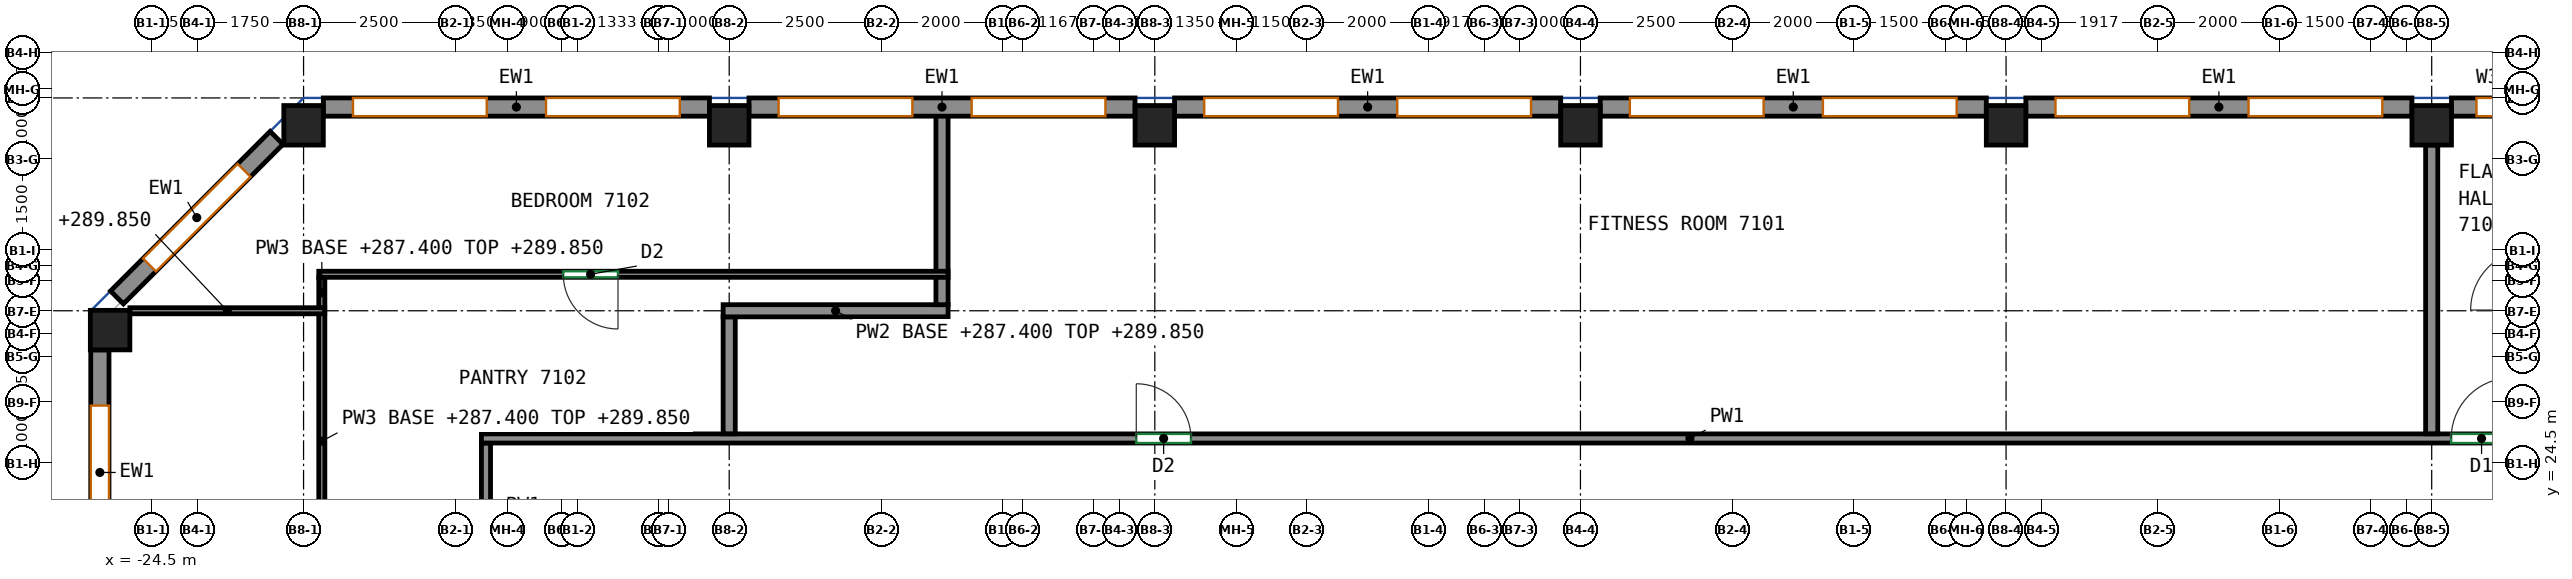
"""IFC4 building model, lengths in metres.
Left out: names, types, materials, properties, quantities, classifications, styles, units other than length and angle.
Written with IfcOpenShell. Run it as: python <this file> out.ifc"""

import sys

from ifc_helpers import new_model, si_unit, direction, frame, frame_2d, origin, origin_2d, place, context, subcontext, project, spatial, rectangle, extrude, source, transform, mapped, element, fill, save


model = new_model("IFC4")
c1 = context("Model", 3, precision=1e-05, world=origin(), true_north=direction((0.0, 1.0)))
c2 = subcontext(c1, "Body", "Model", "MODEL_VIEW")
j1 = project(units=[si_unit("LENGTHUNIT", "METRE"), si_unit("PLANEANGLEUNIT", "RADIAN")], contexts=[c1])
p1 = place(None, origin())
s1 = spatial("IfcSite", under=j1, at=p1, CompositionType="ELEMENT")
p2 = place(p1, origin())
s2 = spatial("IfcBuilding", under=s1, at=p2, CompositionType="ELEMENT")
p3 = place(p2, frame((0.0, 0.0, 287.4)))
s3 = spatial("IfcBuildingStorey", under=s2, at=p3, CompositionType="ELEMENT", Elevation=287.4)
m1 = source(origin(), c2, "Body", "SweptSolid", [
    extrude(rectangle(XDim=0.65, YDim=0.65, at=origin_2d()), origin(), (0.0, 0.0, 1.0), 3.0),
])
for number, where, z_axis, x_axis in (
    (1, (-25.182, 26.682, 0.0), (0.0, 0.0, 1.0), (1.0, 0.0, 0.0)),
    (2, (-22.0, 30.05, 0.0), (0.0, 0.0, 1.0), (1.0, 0.0, 0.0)),
    (3, (-15.0, 30.05, 0.0), (0.0, 0.0, 1.0), (1.0, 0.0, 0.0)),
    (4, (-8.0, 30.05, 0.0), (0.0, 0.0, 1.0), (1.0, 0.0, 0.0)),
    (5, (-1.0, 30.05, 0.0), (0.0, 0.0, 1.0), (1.0, 0.0, 0.0)),
    (6, (6.0, 30.05, 0.0), (0.0, 0.0, 1.0), (1.0, 0.0, 0.0)),
    (7, (13.0, 30.05, 0.0), (0.0, 0.0, 1.0), (1.0, 0.0, 0.0)),
):
    element("IfcColumn", number, at=place(p3, frame(where, z_axis=z_axis, x_axis=x_axis)), inside=s3, PredefinedType="COLUMN", context=c2, shape_type="MappedRepresentation", body=[
        mapped(m1, transform((0.0, 0.0, 0.0))),
    ])
m2 = source(origin(), c2, "Body", "SweptSolid", [
    extrude(rectangle(XDim=6.032, YDim=0.3, at=frame_2d((3.016, 0.0))), origin(), (0.0, 0.0, 1.0), 3.0),
])
p4 = place(p3, frame((19.357, 30.35, 0.0), z_axis=(0.0, 0.0, 1.0), x_axis=(-1.0, 0.0, 0.0)))
e8 = element("IfcWall", 8, at=p4, inside=s3, PredefinedType="SOLIDWALL", context=c2, shape_type="MappedRepresentation", body=[
    mapped(m2, transform((0.0, 0.0, 0.0))),
])
p5 = place(p4, frame((0.408, 0.0, 0.8)))
e9 = element("IfcOpeningElement", 9, at=p5, cuts=e8, PredefinedType="OPENING", context=c2, shape_type="SweptSolid", body=[
    extrude(rectangle(XDim=2.2, YDim=2.05, at=frame_2d((1.1, 1.025))), frame((0.0, 0.16, 0.0), z_axis=(0.0, -1.0, 0.0), x_axis=(1.0, 0.0, 0.0)), (0.0, 0.0, 1.0), 0.32),
])
p6 = place(p4, frame((3.445, 0.0, 0.8)))
e10 = element("IfcOpeningElement", 10, at=p6, cuts=e8, PredefinedType="OPENING", context=c2, shape_type="SweptSolid", body=[
    extrude(rectangle(XDim=1.1, YDim=2.05, at=frame_2d((0.55, 1.025))), frame((0.0, 0.16, 0.0), z_axis=(0.0, -1.0, 0.0), x_axis=(1.0, 0.0, 0.0)), (0.0, 0.0, 1.0), 0.32),
])
p7 = place(p4, frame((4.87, 0.0, 0.8)))
e11 = element("IfcOpeningElement", 11, at=p7, cuts=e8, PredefinedType="OPENING", context=c2, shape_type="SweptSolid", body=[
    extrude(rectangle(XDim=0.75, YDim=2.05, at=frame_2d((0.375, 1.025))), frame((0.0, 0.16, 0.0), z_axis=(0.0, -1.0, 0.0), x_axis=(1.0, 0.0, 0.0)), (0.0, 0.0, 1.0), 0.32),
])
m3 = source(origin(), c2, "Body", "SweptSolid", [
    extrude(rectangle(XDim=6.35, YDim=0.3, at=frame_2d((3.175, 0.0))), origin(), (0.0, 0.0, 1.0), 3.0),
])
p8 = place(p3, frame((12.675, 30.35, 0.0), z_axis=(0.0, 0.0, 1.0), x_axis=(-1.0, 0.0, 0.0)))
e12 = element("IfcWall", 12, at=p8, inside=s3, PredefinedType="SOLIDWALL", context=c2, shape_type="MappedRepresentation", body=[
    mapped(m3, transform((0.0, 0.0, 0.0))),
])
p9 = place(p8, frame((0.488, 0.0, 0.8)))
e13 = element("IfcOpeningElement", 13, at=p9, cuts=e12, PredefinedType="OPENING", context=c2, shape_type="SweptSolid", body=[
    extrude(rectangle(XDim=2.2, YDim=2.05, at=frame_2d((1.1, 1.025))), frame((0.0, 0.16, 0.0), z_axis=(0.0, -1.0, 0.0), x_axis=(1.0, 0.0, 0.0)), (0.0, 0.0, 1.0), 0.32),
])
p10 = place(p8, frame((3.663, 0.0, 0.8)))
e14 = element("IfcOpeningElement", 14, at=p10, cuts=e12, PredefinedType="OPENING", context=c2, shape_type="SweptSolid", body=[
    extrude(rectangle(XDim=2.2, YDim=2.05, at=frame_2d((1.1, 1.025))), frame((0.0, 0.16, 0.0), z_axis=(0.0, -1.0, 0.0), x_axis=(1.0, 0.0, 0.0)), (0.0, 0.0, 1.0), 0.32),
])
p11 = place(p3, frame((5.675, 30.35, 0.0), z_axis=(0.0, 0.0, 1.0), x_axis=(-1.0, 0.0, 0.0)))
e15 = element("IfcWall", 15, at=p11, inside=s3, PredefinedType="SOLIDWALL", context=c2, shape_type="MappedRepresentation", body=[
    mapped(m3, transform((0.0, 0.0, 0.0))),
])
p12 = place(p11, frame((0.488, 0.0, 0.8)))
e16 = element("IfcOpeningElement", 16, at=p12, cuts=e15, PredefinedType="OPENING", context=c2, shape_type="SweptSolid", body=[
    extrude(rectangle(XDim=2.2, YDim=2.05, at=frame_2d((1.1, 1.025))), frame((0.0, 0.16, 0.0), z_axis=(0.0, -1.0, 0.0), x_axis=(1.0, 0.0, 0.0)), (0.0, 0.0, 1.0), 0.32),
])
p13 = place(p11, frame((3.663, 0.0, 0.8)))
e17 = element("IfcOpeningElement", 17, at=p13, cuts=e15, PredefinedType="OPENING", context=c2, shape_type="SweptSolid", body=[
    extrude(rectangle(XDim=2.2, YDim=2.05, at=frame_2d((1.1, 1.025))), frame((0.0, 0.16, 0.0), z_axis=(0.0, -1.0, 0.0), x_axis=(1.0, 0.0, 0.0)), (0.0, 0.0, 1.0), 0.32),
])
p14 = place(p3, frame((-1.325, 30.35, 0.0), z_axis=(0.0, 0.0, 1.0), x_axis=(-1.0, 0.0, 0.0)))
e18 = element("IfcWall", 18, at=p14, inside=s3, PredefinedType="SOLIDWALL", context=c2, shape_type="MappedRepresentation", body=[
    mapped(m3, transform((0.0, 0.0, 0.0))),
])
p15 = place(p14, frame((0.488, 0.0, 0.8)))
e19 = element("IfcOpeningElement", 19, at=p15, cuts=e18, PredefinedType="OPENING", context=c2, shape_type="SweptSolid", body=[
    extrude(rectangle(XDim=2.2, YDim=2.05, at=frame_2d((1.1, 1.025))), frame((0.0, 0.16, 0.0), z_axis=(0.0, -1.0, 0.0), x_axis=(1.0, 0.0, 0.0)), (0.0, 0.0, 1.0), 0.32),
])
p16 = place(p14, frame((3.663, 0.0, 0.8)))
e20 = element("IfcOpeningElement", 20, at=p16, cuts=e18, PredefinedType="OPENING", context=c2, shape_type="SweptSolid", body=[
    extrude(rectangle(XDim=2.2, YDim=2.05, at=frame_2d((1.1, 1.025))), frame((0.0, 0.16, 0.0), z_axis=(0.0, -1.0, 0.0), x_axis=(1.0, 0.0, 0.0)), (0.0, 0.0, 1.0), 0.32),
])
p17 = place(p3, frame((-8.325, 30.35, 0.0), z_axis=(0.0, 0.0, 1.0), x_axis=(-1.0, 0.0, 0.0)))
e21 = element("IfcWall", 21, at=p17, inside=s3, PredefinedType="SOLIDWALL", context=c2, shape_type="MappedRepresentation", body=[
    mapped(m3, transform((0.0, 0.0, 0.0))),
])
p18 = place(p17, frame((0.488, 0.0, 0.8)))
e22 = element("IfcOpeningElement", 22, at=p18, cuts=e21, PredefinedType="OPENING", context=c2, shape_type="SweptSolid", body=[
    extrude(rectangle(XDim=2.2, YDim=2.05, at=frame_2d((1.1, 1.025))), frame((0.0, 0.16, 0.0), z_axis=(0.0, -1.0, 0.0), x_axis=(1.0, 0.0, 0.0)), (0.0, 0.0, 1.0), 0.32),
])
p19 = place(p17, frame((3.663, 0.0, 0.8)))
e23 = element("IfcOpeningElement", 23, at=p19, cuts=e21, PredefinedType="OPENING", context=c2, shape_type="SweptSolid", body=[
    extrude(rectangle(XDim=2.2, YDim=2.05, at=frame_2d((1.1, 1.025))), frame((0.0, 0.16, 0.0), z_axis=(0.0, -1.0, 0.0), x_axis=(1.0, 0.0, 0.0)), (0.0, 0.0, 1.0), 0.32),
])
p20 = place(p3, frame((-15.325, 30.35, 0.0), z_axis=(0.0, 0.0, 1.0), x_axis=(-1.0, 0.0, 0.0)))
e24 = element("IfcWall", 24, at=p20, inside=s3, PredefinedType="SOLIDWALL", context=c2, shape_type="MappedRepresentation", body=[
    mapped(m3, transform((0.0, 0.0, 0.0))),
])
p21 = place(p20, frame((0.488, 0.0, 0.8)))
e25 = element("IfcOpeningElement", 25, at=p21, cuts=e24, PredefinedType="OPENING", context=c2, shape_type="SweptSolid", body=[
    extrude(rectangle(XDim=2.2, YDim=2.05, at=frame_2d((1.1, 1.025))), frame((0.0, 0.16, 0.0), z_axis=(0.0, -1.0, 0.0), x_axis=(1.0, 0.0, 0.0)), (0.0, 0.0, 1.0), 0.32),
])
p22 = place(p20, frame((3.663, 0.0, 0.8)))
e26 = element("IfcOpeningElement", 26, at=p22, cuts=e24, PredefinedType="OPENING", context=c2, shape_type="SweptSolid", body=[
    extrude(rectangle(XDim=2.2, YDim=2.05, at=frame_2d((1.1, 1.025))), frame((0.0, 0.16, 0.0), z_axis=(0.0, -1.0, 0.0), x_axis=(1.0, 0.0, 0.0)), (0.0, 0.0, 1.0), 0.32),
])
m4 = source(origin(), c2, "Body", "SweptSolid", [
    extrude(rectangle(XDim=3.712, YDim=0.3, at=frame_2d((1.856, 0.0))), origin(), (0.0, 0.0, 1.0), 3.0),
])
p23 = place(p3, frame((-22.444, 29.844, 0.0), z_axis=(0.0, 0.0, 1.0), x_axis=(-0.707106781187, -0.707106781187, 0.0)))
e27 = element("IfcWall", 27, at=p23, inside=s3, PredefinedType="SOLIDWALL", context=c2, shape_type="MappedRepresentation", body=[
    mapped(m4, transform((0.0, 0.0, 0.0))),
])
p24 = place(p23, frame((0.756, 0.0, 0.8)))
e28 = element("IfcOpeningElement", 28, at=p24, cuts=e27, PredefinedType="OPENING", context=c2, shape_type="SweptSolid", body=[
    extrude(rectangle(XDim=2.2, YDim=2.05, at=frame_2d((1.1, 1.025))), frame((0.0, 0.16, 0.0), z_axis=(0.0, -1.0, 0.0), x_axis=(1.0, 0.0, 0.0)), (0.0, 0.0, 1.0), 0.32),
])
m5 = source(origin(), c2, "Body", "SweptSolid", [
    extrude(rectangle(XDim=4.032, YDim=0.3, at=frame_2d((2.016, 0.0))), origin(), (0.0, 0.0, 1.0), 3.0),
])
p25 = place(p3, frame((-25.35, 26.357, 0.0), z_axis=(0.0, 0.0, 1.0), x_axis=(0.0, -1.0, 0.0)))
e29 = element("IfcWall", 29, at=p25, inside=s3, PredefinedType="SOLIDWALL", context=c2, shape_type="MappedRepresentation", body=[
    mapped(m5, transform((0.0, 0.0, 0.0))),
])
p26 = place(p25, frame((0.916, 0.0, 0.8)))
e30 = element("IfcOpeningElement", 30, at=p26, cuts=e29, PredefinedType="OPENING", context=c2, shape_type="SweptSolid", body=[
    extrude(rectangle(XDim=2.2, YDim=2.05, at=frame_2d((1.1, 1.025))), frame((0.0, 0.16, 0.0), z_axis=(0.0, -1.0, 0.0), x_axis=(1.0, 0.0, 0.0)), (0.0, 0.0, 1.0), 0.32),
])
p27 = place(p3, frame((-19.0, 22.74, 0.0), z_axis=(0.0, 0.0, 1.0), x_axis=(0.0, 1.0, 0.0)))
e31 = element("IfcWall", 31, at=p27, inside=s3, PredefinedType="PARTITIONING", context=c2, shape_type="SweptSolid", body=[
    extrude(rectangle(XDim=2.085, YDim=0.15, at=frame_2d((1.042, 0.0))), origin(), (0.0, 0.0, 1.0), 3.0),
])
p28 = place(p3, frame((-19.075, 24.9, 0.0), z_axis=(0.0, 0.0, 1.0), x_axis=(1.0, 0.0, 0.0)))
e32 = element("IfcWall", 32, at=p28, inside=s3, PredefinedType="PARTITIONING", context=c2, shape_type="SweptSolid", body=[
    extrude(rectangle(XDim=39.75, YDim=0.15, at=frame_2d((19.875, 0.0))), origin(), (0.0, 0.0, 1.0), 3.0),
])
p29 = place(p28, frame((10.77, 0.0, 0.0)))
e33 = element("IfcOpeningElement", 33, at=p29, cuts=e32, PredefinedType="OPENING", context=c2, shape_type="SweptSolid", body=[
    extrude(rectangle(XDim=0.9, YDim=2.1, at=frame_2d((0.45, 1.05))), frame((0.0, 0.085, 0.0), z_axis=(0.0, -1.0, 0.0), x_axis=(1.0, 0.0, 0.0)), (0.0, 0.0, 1.0), 0.17),
])
p30 = place(p28, frame((32.395, 0.0, 0.0)))
e34 = element("IfcOpeningElement", 34, at=p30, cuts=e32, PredefinedType="OPENING", context=c2, shape_type="SweptSolid", body=[
    extrude(rectangle(XDim=1.0, YDim=2.1, at=frame_2d((0.5, 1.05))), frame((0.0, 0.085, 0.0), z_axis=(0.0, -1.0, 0.0), x_axis=(1.0, 0.0, 0.0)), (0.0, 0.0, 1.0), 0.17),
])
p31 = place(p3, frame((13.0, 24.977, 0.0), z_axis=(0.0, 0.0, 1.0), x_axis=(0.0, 1.0, 0.0)))
e35 = element("IfcWall", 35, at=p31, inside=s3, PredefinedType="PARTITIONING", context=c2, shape_type="SweptSolid", body=[
    extrude(rectangle(XDim=4.748, YDim=0.2, at=frame_2d((2.374, 0.0))), origin(), (0.0, 0.0, 1.0), 3.0),
])
p32 = place(p3, frame((-15.0, 26.9, 0.0), z_axis=(0.0, 0.0, 1.0), x_axis=(0.0, -1.0, 0.0)))
e36 = element("IfcWall", 36, at=p32, inside=s3, PredefinedType="PARTITIONING", context=c2, shape_type="SweptSolid", body=[
    extrude(rectangle(XDim=1.923, YDim=0.2, at=frame_2d((0.961, 0.0))), origin(), (0.0, 0.0, 1.0), 3.0),
])
p33 = place(p3, frame((-11.4, 27.0, 0.0), z_axis=(0.0, 0.0, 1.0), x_axis=(-1.0, 0.0, 0.0)))
e37 = element("IfcWall", 37, at=p33, inside=s3, PredefinedType="PARTITIONING", context=c2, shape_type="SweptSolid", body=[
    extrude(rectangle(XDim=3.7, YDim=0.2, at=frame_2d((1.85, 0.0))), origin(), (0.0, 0.0, 1.0), 2.45),
])
p34 = place(p3, frame((-11.5, 27.1, 0.0), z_axis=(0.0, 0.0, 1.0), x_axis=(0.0, 1.0, 0.0)))
e38 = element("IfcWall", 38, at=p34, inside=s3, PredefinedType="PARTITIONING", context=c2, shape_type="SweptSolid", body=[
    extrude(rectangle(XDim=0.46, YDim=0.2, at=frame_2d((0.23, 0.0))), origin(), (0.0, 0.0, 1.0), 3.0),
])
p35 = place(p3, frame((-11.5, 27.642, 0.0), z_axis=(0.0, 0.0, 1.0), x_axis=(0.0, 1.0, 0.0)))
e39 = element("IfcWall", 39, at=p35, inside=s3, PredefinedType="PARTITIONING", context=c2, shape_type="SweptSolid", body=[
    extrude(rectangle(XDim=2.608, YDim=0.2, at=frame_2d((1.304, 0.0))), origin(), (0.0, 0.0, 1.0), 3.0),
])
p36 = place(p3, frame((-21.7, 22.75, 0.0), z_axis=(0.0, 0.0, 1.0), x_axis=(0.0, 1.0, 0.0)))
e40 = element("IfcWall", 40, at=p36, inside=s3, PredefinedType="PARTITIONING", context=c2, shape_type="SweptSolid", body=[
    extrude(rectangle(XDim=4.21, YDim=0.1, at=frame_2d((2.105, 0.0))), origin(), (0.0, 0.0, 1.0), 2.45),
])
p37 = place(p3, frame((-21.7, 27.04, 0.0), z_axis=(0.0, 0.0, 1.0), x_axis=(0.0, 1.0, 0.0)))
e41 = element("IfcWall", 41, at=p37, inside=s3, PredefinedType="PARTITIONING", context=c2, shape_type="SweptSolid", body=[
    extrude(rectangle(XDim=0.51, YDim=0.1, at=frame_2d((0.255, 0.0))), origin(), (0.0, 0.0, 1.0), 2.45),
])
p38 = place(p3, frame((-11.4, 27.6, 0.0), z_axis=(0.0, 0.0, 1.0), x_axis=(-1.0, 0.0, 0.0)))
e42 = element("IfcWall", 42, at=p38, inside=s3, PredefinedType="PARTITIONING", context=c2, shape_type="SweptSolid", body=[
    extrude(rectangle(XDim=10.35, YDim=0.1, at=frame_2d((5.175, 0.0))), origin(), (0.0, 0.0, 1.0), 3.0),
])
p39 = place(p38, frame((5.429, 0.0, 0.0)))
e43 = element("IfcOpeningElement", 43, at=p39, cuts=e42, PredefinedType="OPENING", context=c2, shape_type="SweptSolid", body=[
    extrude(rectangle(XDim=0.9, YDim=2.1, at=frame_2d((0.45, 1.05))), frame((0.0, 0.06, 0.0), z_axis=(0.0, -1.0, 0.0), x_axis=(1.0, 0.0, 0.0)), (0.0, 0.0, 1.0), 0.12),
])
p40 = place(p3, frame((-21.652, 27.0, 0.0), z_axis=(0.0, 0.0, 1.0), x_axis=(-1.0, 0.0, 0.0)))
e44 = element("IfcWall", 44, at=p40, inside=s3, PredefinedType="PARTITIONING", context=c2, shape_type="SweptSolid", body=[
    extrude(rectangle(XDim=3.205, YDim=0.1, at=frame_2d((1.603, 0.0))), origin(), (0.0, 0.0, 1.0), 2.45),
])
p41 = place(p9, origin())
e45 = element("IfcWindow", 45, at=p41, inside=s3, PartitioningType="SINGLE_PANEL", PredefinedType="WINDOW", context=c2, shape_type="SweptSolid", body=[
    extrude(rectangle(XDim=2.2, YDim=2.05, at=frame_2d((1.1, 1.025))), frame((0.0, 0.03, 0.0), z_axis=(0.0, -1.0, 0.0), x_axis=(1.0, 0.0, 0.0)), (0.0, 0.0, 1.0), 0.06),
])
fill(e13, e45)
p42 = place(p10, origin())
e46 = element("IfcWindow", 46, at=p42, inside=s3, PartitioningType="SINGLE_PANEL", PredefinedType="WINDOW", context=c2, shape_type="SweptSolid", body=[
    extrude(rectangle(XDim=2.2, YDim=2.05, at=frame_2d((1.1, 1.025))), frame((0.0, 0.03, 0.0), z_axis=(0.0, -1.0, 0.0), x_axis=(1.0, 0.0, 0.0)), (0.0, 0.0, 1.0), 0.06),
])
fill(e14, e46)
p43 = place(p12, origin())
e47 = element("IfcWindow", 47, at=p43, inside=s3, PartitioningType="SINGLE_PANEL", PredefinedType="WINDOW", context=c2, shape_type="SweptSolid", body=[
    extrude(rectangle(XDim=2.2, YDim=2.05, at=frame_2d((1.1, 1.025))), frame((0.0, 0.03, 0.0), z_axis=(0.0, -1.0, 0.0), x_axis=(1.0, 0.0, 0.0)), (0.0, 0.0, 1.0), 0.06),
])
fill(e16, e47)
p44 = place(p13, origin())
e48 = element("IfcWindow", 48, at=p44, inside=s3, PartitioningType="SINGLE_PANEL", PredefinedType="WINDOW", context=c2, shape_type="SweptSolid", body=[
    extrude(rectangle(XDim=2.2, YDim=2.05, at=frame_2d((1.1, 1.025))), frame((0.0, 0.03, 0.0), z_axis=(0.0, -1.0, 0.0), x_axis=(1.0, 0.0, 0.0)), (0.0, 0.0, 1.0), 0.06),
])
fill(e17, e48)
p45 = place(p15, origin())
e49 = element("IfcWindow", 49, at=p45, inside=s3, PartitioningType="SINGLE_PANEL", PredefinedType="WINDOW", context=c2, shape_type="SweptSolid", body=[
    extrude(rectangle(XDim=2.2, YDim=2.05, at=frame_2d((1.1, 1.025))), frame((0.0, 0.03, 0.0), z_axis=(0.0, -1.0, 0.0), x_axis=(1.0, 0.0, 0.0)), (0.0, 0.0, 1.0), 0.06),
])
fill(e19, e49)
p46 = place(p16, origin())
e50 = element("IfcWindow", 50, at=p46, inside=s3, PartitioningType="SINGLE_PANEL", PredefinedType="WINDOW", context=c2, shape_type="SweptSolid", body=[
    extrude(rectangle(XDim=2.2, YDim=2.05, at=frame_2d((1.1, 1.025))), frame((0.0, 0.03, 0.0), z_axis=(0.0, -1.0, 0.0), x_axis=(1.0, 0.0, 0.0)), (0.0, 0.0, 1.0), 0.06),
])
fill(e20, e50)
p47 = place(p18, origin())
e51 = element("IfcWindow", 51, at=p47, inside=s3, PartitioningType="SINGLE_PANEL", PredefinedType="WINDOW", context=c2, shape_type="SweptSolid", body=[
    extrude(rectangle(XDim=2.2, YDim=2.05, at=frame_2d((1.1, 1.025))), frame((0.0, 0.03, 0.0), z_axis=(0.0, -1.0, 0.0), x_axis=(1.0, 0.0, 0.0)), (0.0, 0.0, 1.0), 0.06),
])
fill(e22, e51)
p48 = place(p19, origin())
e52 = element("IfcWindow", 52, at=p48, inside=s3, PartitioningType="SINGLE_PANEL", PredefinedType="WINDOW", context=c2, shape_type="SweptSolid", body=[
    extrude(rectangle(XDim=2.2, YDim=2.05, at=frame_2d((1.1, 1.025))), frame((0.0, 0.03, 0.0), z_axis=(0.0, -1.0, 0.0), x_axis=(1.0, 0.0, 0.0)), (0.0, 0.0, 1.0), 0.06),
])
fill(e23, e52)
p49 = place(p21, origin())
e53 = element("IfcWindow", 53, at=p49, inside=s3, PartitioningType="SINGLE_PANEL", PredefinedType="WINDOW", context=c2, shape_type="SweptSolid", body=[
    extrude(rectangle(XDim=2.2, YDim=2.05, at=frame_2d((1.1, 1.025))), frame((0.0, 0.03, 0.0), z_axis=(0.0, -1.0, 0.0), x_axis=(1.0, 0.0, 0.0)), (0.0, 0.0, 1.0), 0.06),
])
fill(e25, e53)
p50 = place(p22, origin())
e54 = element("IfcWindow", 54, at=p50, inside=s3, PartitioningType="SINGLE_PANEL", PredefinedType="WINDOW", context=c2, shape_type="SweptSolid", body=[
    extrude(rectangle(XDim=2.2, YDim=2.05, at=frame_2d((1.1, 1.025))), frame((0.0, 0.03, 0.0), z_axis=(0.0, -1.0, 0.0), x_axis=(1.0, 0.0, 0.0)), (0.0, 0.0, 1.0), 0.06),
])
fill(e26, e54)
p51 = place(p24, origin())
e55 = element("IfcWindow", 55, at=p51, inside=s3, PartitioningType="SINGLE_PANEL", PredefinedType="WINDOW", context=c2, shape_type="SweptSolid", body=[
    extrude(rectangle(XDim=2.2, YDim=2.05, at=frame_2d((1.1, 1.025))), frame((0.0, 0.03, 0.0), z_axis=(0.0, -1.0, 0.0), x_axis=(1.0, 0.0, 0.0)), (0.0, 0.0, 1.0), 0.06),
])
fill(e28, e55)
p52 = place(p26, origin())
e56 = element("IfcWindow", 56, at=p52, inside=s3, PartitioningType="SINGLE_PANEL", PredefinedType="WINDOW", context=c2, shape_type="SweptSolid", body=[
    extrude(rectangle(XDim=2.2, YDim=2.05, at=frame_2d((1.1, 1.025))), frame((0.0, 0.03, 0.0), z_axis=(0.0, -1.0, 0.0), x_axis=(1.0, 0.0, 0.0)), (0.0, 0.0, 1.0), 0.06),
])
fill(e30, e56)
p53 = place(p29, origin())
e57 = element("IfcDoor", 57, at=p53, inside=s3, OperationType="SINGLE_SWING_LEFT", PredefinedType="DOOR", context=c2, shape_type="SweptSolid", body=[
    extrude(rectangle(XDim=0.9, YDim=2.1, at=frame_2d((0.45, 1.05))), frame((0.0, 0.025, 0.0), z_axis=(0.0, -1.0, 0.0), x_axis=(1.0, 0.0, 0.0)), (0.0, 0.0, 1.0), 0.05),
])
fill(e33, e57)
p54 = place(p30, origin())
e58 = element("IfcDoor", 58, at=p54, inside=s3, OperationType="SINGLE_SWING_RIGHT", PredefinedType="DOOR", context=c2, shape_type="SweptSolid", body=[
    extrude(rectangle(XDim=1.0, YDim=2.1, at=frame_2d((0.5, 1.05))), frame((0.0, 0.025, 0.0), z_axis=(0.0, -1.0, 0.0), x_axis=(1.0, 0.0, 0.0)), (0.0, 0.0, 1.0), 0.05),
])
fill(e34, e58)
p55 = place(p39, origin())
e59 = element("IfcDoor", 59, at=p55, inside=s3, OperationType="SINGLE_SWING_LEFT", PredefinedType="DOOR", context=c2, shape_type="SweptSolid", body=[
    extrude(rectangle(XDim=0.9, YDim=2.1, at=frame_2d((0.45, 1.05))), frame((0.0, 0.025, 0.0), z_axis=(0.0, -1.0, 0.0), x_axis=(1.0, 0.0, 0.0)), (0.0, 0.0, 1.0), 0.05),
])
fill(e43, e59)
p56 = place(p7, origin())
e60 = element("IfcWindow", 60, at=p56, inside=s3, PartitioningType="SINGLE_PANEL", PredefinedType="WINDOW", context=c2, shape_type="SweptSolid", body=[
    extrude(rectangle(XDim=0.75, YDim=2.05, at=frame_2d((0.375, 1.025))), frame((0.0, 0.03, 0.0), z_axis=(0.0, -1.0, 0.0), x_axis=(1.0, 0.0, 0.0)), (0.0, 0.0, 1.0), 0.06),
])
fill(e11, e60)
save(model, sys.argv[1])
